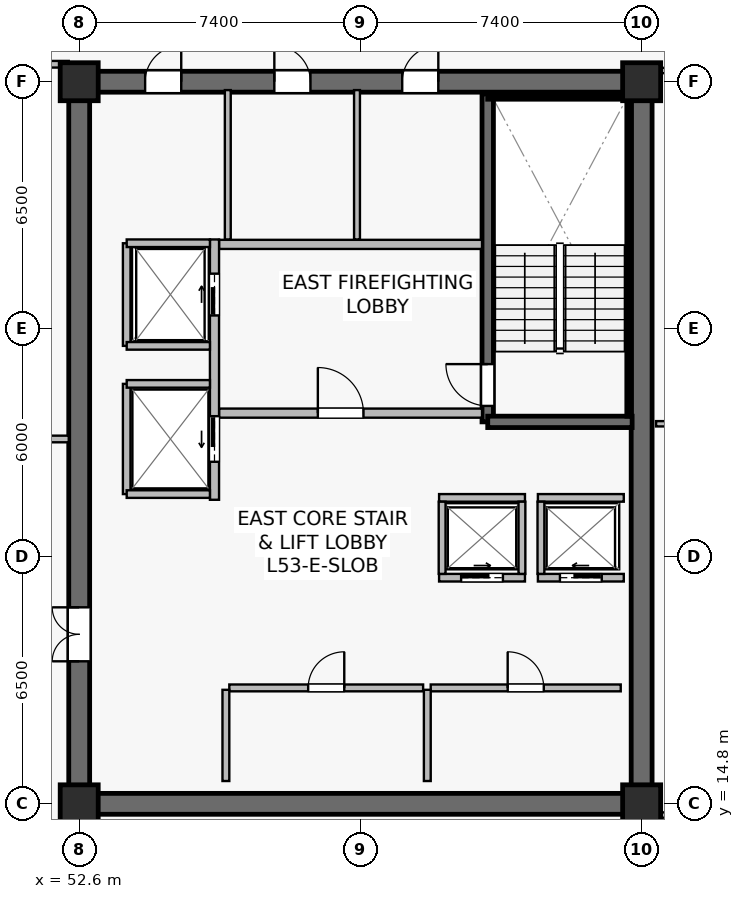
"""IFC4 building model, lengths in metres.
Left out: names, types, materials, properties, quantities, classifications, styles, units other than length and angle.
Written with IfcOpenShell. Run it as: python <this file> out.ifc"""

import sys

from ifc_helpers import new_model, si_unit, direction, frame, frame_2d, origin, origin_2d, place, context, subcontext, project, spatial, rectangle, extrude, source, transform, mapped, element, fill, save


model = new_model("IFC4")
c1 = context("Model", 3, precision=1e-05, world=origin(), true_north=direction((0.0, 1.0)))
c2 = subcontext(c1, "Body", "Model", "MODEL_VIEW")
j1 = project(units=[si_unit("LENGTHUNIT", "METRE"), si_unit("PLANEANGLEUNIT", "RADIAN")], contexts=[c1])
p1 = place(None, origin())
s1 = spatial("IfcSite", under=j1, at=p1, CompositionType="ELEMENT")
p2 = place(p1, origin())
s2 = spatial("IfcBuilding", under=s1, at=p2, CompositionType="ELEMENT")
p3 = place(p2, frame((0.0, 0.0, 221.9)))
s3 = spatial("IfcBuildingStorey", under=s2, at=p3, CompositionType="ELEMENT", Elevation=221.9)
p4 = place(p3, frame((52.325, 14.8, 0.0), z_axis=(0.0, 0.0, 1.0), x_axis=(1.0, 0.0, 0.0)))
e1 = element("IfcWall", 1, at=p4, inside=s3, PredefinedType="SHEAR", context=c2, shape_type="SweptSolid", body=[
    extrude(rectangle(XDim=15.35, YDim=0.55, at=frame_2d((7.675, 0.0))), origin(), (0.0, 0.0, 1.0), 3.8),
])
p5 = place(p3, frame((52.325, 33.8, 0.0), z_axis=(0.0, 0.0, 1.0), x_axis=(1.0, 0.0, 0.0)))
e2 = element("IfcWall", 2, at=p5, inside=s3, PredefinedType="SHEAR", context=c2, shape_type="SweptSolid", body=[
    extrude(rectangle(XDim=15.35, YDim=0.55, at=frame_2d((7.675, 0.0))), origin(), (0.0, 0.0, 1.0), 3.8),
])
p6 = place(p5, frame((8.775, 0.0, 0.0)))
e3 = element("IfcOpeningElement", 3, at=p6, cuts=e2, PredefinedType="OPENING", context=c2, shape_type="SweptSolid", body=[
    extrude(rectangle(XDim=0.95, YDim=2.15, at=frame_2d((0.475, 1.075))), frame((0.0, 0.285, 0.0), z_axis=(0.0, -1.0, 0.0), x_axis=(1.0, 0.0, 0.0)), (0.0, 0.0, 1.0), 0.57),
])
p7 = place(p5, frame((5.41, 0.0, 0.0)))
e4 = element("IfcOpeningElement", 4, at=p7, cuts=e2, PredefinedType="OPENING", context=c2, shape_type="SweptSolid", body=[
    extrude(rectangle(XDim=0.95, YDim=2.15, at=frame_2d((0.475, 1.075))), frame((0.0, 0.285, 0.0), z_axis=(0.0, -1.0, 0.0), x_axis=(1.0, 0.0, 0.0)), (0.0, 0.0, 1.0), 0.57),
])
p8 = place(p5, frame((2.01, 0.0, 0.0)))
e5 = element("IfcOpeningElement", 5, at=p8, cuts=e2, PredefinedType="OPENING", context=c2, shape_type="SweptSolid", body=[
    extrude(rectangle(XDim=0.95, YDim=2.15, at=frame_2d((0.475, 1.075))), frame((0.0, 0.285, 0.0), z_axis=(0.0, -1.0, 0.0), x_axis=(1.0, 0.0, 0.0)), (0.0, 0.0, 1.0), 0.57),
])
p9 = place(p3, frame((52.6, 15.075, 0.0), z_axis=(0.0, 0.0, 1.0), x_axis=(0.0, 1.0, 0.0)))
e6 = element("IfcWall", 6, at=p9, inside=s3, PredefinedType="SHEAR", context=c2, shape_type="SweptSolid", body=[
    extrude(rectangle(XDim=18.45, YDim=0.55, at=frame_2d((9.225, 0.0))), origin(), (0.0, 0.0, 1.0), 3.8),
])
p10 = place(p9, frame((3.475, 0.0, 0.0)))
e7 = element("IfcOpeningElement", 7, at=p10, cuts=e6, PredefinedType="OPENING", context=c2, shape_type="SweptSolid", body=[
    extrude(rectangle(XDim=1.42, YDim=2.2, at=frame_2d((0.71, 1.1))), frame((0.0, 0.285, 0.0), z_axis=(0.0, -1.0, 0.0), x_axis=(1.0, 0.0, 0.0)), (0.0, 0.0, 1.0), 0.57),
])
p11 = place(p3, frame((67.4, 15.075, 0.0), z_axis=(0.0, 0.0, 1.0), x_axis=(0.0, 1.0, 0.0)))
e8 = element("IfcWall", 8, at=p11, inside=s3, PredefinedType="SHEAR", context=c2, shape_type="SweptSolid", body=[
    extrude(rectangle(XDim=18.45, YDim=0.55, at=frame_2d((9.225, 0.0))), origin(), (0.0, 0.0, 1.0), 3.8),
])
p12 = place(p3, frame((63.35, 24.85, 0.0), z_axis=(0.0, 0.0, 1.0), x_axis=(0.0, 1.0, 0.0)))
e9 = element("IfcWall", 9, at=p12, inside=s3, PredefinedType="SHEAR", context=c2, shape_type="SweptSolid", body=[
    extrude(rectangle(XDim=8.63, YDim=0.3, at=frame_2d((4.315, 0.0))), origin(), (0.0, 0.0, 1.0), 3.8),
])
p13 = place(p12, frame((0.42, 0.0, 0.0)))
e10 = element("IfcOpeningElement", 10, at=p13, cuts=e9, PredefinedType="OPENING", context=c2, shape_type="SweptSolid", body=[
    extrude(rectangle(XDim=1.1, YDim=2.15, at=frame_2d((0.55, 1.075))), frame((0.0, 0.16, 0.0), z_axis=(0.0, -1.0, 0.0), x_axis=(1.0, 0.0, 0.0)), (0.0, 0.0, 1.0), 0.32),
])
p14 = place(p3, frame((63.35, 24.85, 0.0), z_axis=(0.0, 0.0, 1.0), x_axis=(1.0, 0.0, 0.0)))
e11 = element("IfcWall", 11, at=p14, inside=s3, PredefinedType="SHEAR", context=c2, shape_type="SweptSolid", body=[
    extrude(rectangle(XDim=3.8, YDim=0.3, at=frame_2d((1.9, 0.0))), origin(), (0.0, 0.0, 1.0), 3.8),
])
p15 = place(p3, frame((63.35, 33.4, 0.0), z_axis=(0.0, 0.0, 1.0), x_axis=(1.0, 0.0, 0.0)))
e12 = element("IfcWall", 12, at=p15, inside=s3, PredefinedType="SOLIDWALL", context=c2, shape_type="SweptSolid", body=[
    extrude(rectangle(XDim=3.72, YDim=0.12, at=frame_2d((1.86, 0.0))), origin(), (0.0, 0.0, 1.0), 3.8),
])
p16 = place(p3, frame((67.07, 25.0, 0.0), z_axis=(0.0, 0.0, 1.0), x_axis=(0.0, 1.0, 0.0)))
e13 = element("IfcWall", 13, at=p16, inside=s3, PredefinedType="SOLIDWALL", context=c2, shape_type="SweptSolid", body=[
    extrude(rectangle(XDim=8.32, YDim=0.12, at=frame_2d((4.16, 0.0))), origin(), (0.0, 0.0, 1.0), 3.8),
])
m1 = source(origin(), c2, "Body", "SweptSolid", [
    extrude(rectangle(XDim=1.0, YDim=1.0, at=origin_2d()), origin(), (0.0, 0.0, 1.0), 4.1),
])
for number, where, z_axis, x_axis in (
    (14, (52.6, 14.8, 0.0), (0.0, 0.0, 1.0), (1.0, 0.0, 0.0)),
    (15, (67.4, 14.8, 0.0), (0.0, 0.0, 1.0), (1.0, 0.0, 0.0)),
    (16, (52.6, 33.8, 0.0), (0.0, 0.0, 1.0), (1.0, 0.0, 0.0)),
    (17, (67.4, 33.8, 0.0), (0.0, 0.0, 1.0), (1.0, 0.0, 0.0)),
):
    element("IfcColumn", number, at=place(p3, frame(where, z_axis=z_axis, x_axis=x_axis)), inside=s3, PredefinedType="COLUMN", context=c2, shape_type="MappedRepresentation", body=[
        mapped(m1, transform((0.0, 0.0, 0.0), scale=1.0)),
    ])
p17 = place(p3, frame((56.28, 25.08, 0.0), z_axis=(0.0, 0.0, 1.0), x_axis=(1.0, 0.0, 0.0)))
e18 = element("IfcWall", 18, at=p17, inside=s3, PredefinedType="SOLIDWALL", context=c2, shape_type="SweptSolid", body=[
    extrude(rectangle(XDim=6.92, YDim=0.24, at=frame_2d((3.46, 0.0))), origin(), (0.0, 0.0, 1.0), 3.197),
])
p18 = place(p17, frame((2.6, 0.0, 0.0)))
e19 = element("IfcOpeningElement", 19, at=p18, cuts=e18, PredefinedType="OPENING", context=c2, shape_type="SweptSolid", body=[
    extrude(rectangle(XDim=1.2, YDim=2.16, at=frame_2d((0.6, 1.08))), frame((0.0, 0.13, 0.0), z_axis=(0.0, -1.0, 0.0), x_axis=(1.0, 0.0, 0.0)), (0.0, 0.0, 1.0), 0.26),
])
p19 = place(p3, frame((56.28, 29.52, 0.0), z_axis=(0.0, 0.0, 1.0), x_axis=(1.0, 0.0, 0.0)))
e20 = element("IfcWall", 20, at=p19, inside=s3, PredefinedType="SOLIDWALL", context=c2, shape_type="SweptSolid", body=[
    extrude(rectangle(XDim=6.92, YDim=0.24, at=frame_2d((3.46, 0.0))), origin(), (0.0, 0.0, 1.0), 3.197),
])
p20 = place(p3, frame((56.16, 22.8, 0.0), z_axis=(0.0, 0.0, 1.0), x_axis=(0.0, 1.0, 0.0)))
e21 = element("IfcWall", 21, at=p20, inside=s3, PredefinedType="SOLIDWALL", context=c2, shape_type="SweptSolid", body=[
    extrude(rectangle(XDim=6.85, YDim=0.24, at=frame_2d((3.425, 0.0))), origin(), (0.0, 0.0, 1.0), 2.935),
])
p21 = place(p20, frame((4.85, 0.0, 0.0)))
e22 = element("IfcOpeningElement", 22, at=p21, cuts=e21, PredefinedType="OPENING", context=c2, shape_type="SweptSolid", body=[
    extrude(rectangle(XDim=1.1, YDim=2.22, at=frame_2d((0.55, 1.11))), frame((0.0, 0.13, 0.0), z_axis=(0.0, -1.0, 0.0), x_axis=(1.0, 0.0, 0.0)), (0.0, 0.0, 1.0), 0.26),
])
p22 = place(p20, frame((1.0, 0.0, 0.0)))
e23 = element("IfcOpeningElement", 23, at=p22, cuts=e21, PredefinedType="OPENING", context=c2, shape_type="SweptSolid", body=[
    extrude(rectangle(XDim=1.2, YDim=2.22, at=frame_2d((0.6, 1.11))), frame((0.0, 0.13, 0.0), z_axis=(0.0, -1.0, 0.0), x_axis=(1.0, 0.0, 0.0)), (0.0, 0.0, 1.0), 0.26),
])
p23 = place(p3, frame((64.67, 20.75, 0.0), z_axis=(0.0, 0.0, 1.0), x_axis=(1.0, 0.0, 0.0)))
e24 = element("IfcWall", 24, at=p23, inside=s3, PredefinedType="SOLIDWALL", context=c2, shape_type="SweptSolid", body=[
    extrude(rectangle(XDim=2.26, YDim=0.2, at=frame_2d((1.13, 0.0))), origin(), (0.0, 0.0, 1.0), 3.8),
])
p24 = place(p23, frame((0.58, 0.0, 0.0)))
e25 = element("IfcOpeningElement", 25, at=p24, cuts=e24, PredefinedType="OPENING", context=c2, shape_type="SweptSolid", body=[
    extrude(rectangle(XDim=1.1, YDim=2.22, at=frame_2d((0.55, 1.11))), frame((0.0, 0.11, 0.0), z_axis=(0.0, -1.0, 0.0), x_axis=(1.0, 0.0, 0.0)), (0.0, 0.0, 1.0), 0.22),
])
p25 = place(p3, frame((64.67, 22.85, 0.0), z_axis=(0.0, 0.0, 1.0), x_axis=(1.0, 0.0, 0.0)))
e26 = element("IfcWall", 26, at=p25, inside=s3, PredefinedType="SOLIDWALL", context=c2, shape_type="SweptSolid", body=[
    extrude(rectangle(XDim=2.26, YDim=0.2, at=frame_2d((1.13, 0.0))), origin(), (0.0, 0.0, 1.0), 3.8),
])
p26 = place(p3, frame((64.75, 20.85, 0.0), z_axis=(0.0, 0.0, 1.0), x_axis=(0.0, 1.0, 0.0)))
e27 = element("IfcWall", 27, at=p26, inside=s3, PredefinedType="SOLIDWALL", context=c2, shape_type="SweptSolid", body=[
    extrude(rectangle(XDim=1.9, YDim=0.18, at=frame_2d((0.95, 0.0))), origin(), (0.0, 0.0, 1.0), 3.8),
])
p27 = place(p3, frame((62.07, 20.75, 0.0), z_axis=(0.0, 0.0, 1.0), x_axis=(1.0, 0.0, 0.0)))
e28 = element("IfcWall", 28, at=p27, inside=s3, PredefinedType="SOLIDWALL", context=c2, shape_type="SweptSolid", body=[
    extrude(rectangle(XDim=2.26, YDim=0.2, at=frame_2d((1.13, 0.0))), origin(), (0.0, 0.0, 1.0), 3.8),
])
p28 = place(p27, frame((0.58, 0.0, 0.0)))
e29 = element("IfcOpeningElement", 29, at=p28, cuts=e28, PredefinedType="OPENING", context=c2, shape_type="SweptSolid", body=[
    extrude(rectangle(XDim=1.1, YDim=2.22, at=frame_2d((0.55, 1.11))), frame((0.0, 0.11, 0.0), z_axis=(0.0, -1.0, 0.0), x_axis=(1.0, 0.0, 0.0)), (0.0, 0.0, 1.0), 0.22),
])
p29 = place(p3, frame((62.07, 22.85, 0.0), z_axis=(0.0, 0.0, 1.0), x_axis=(1.0, 0.0, 0.0)))
e30 = element("IfcWall", 30, at=p29, inside=s3, PredefinedType="SOLIDWALL", context=c2, shape_type="SweptSolid", body=[
    extrude(rectangle(XDim=2.26, YDim=0.2, at=frame_2d((1.13, 0.0))), origin(), (0.0, 0.0, 1.0), 3.8),
])
for number, where, z_axis, x_axis in (
    (31, (62.15, 20.85, 0.0), (0.0, 0.0, 1.0), (0.0, 1.0, 0.0)),
    (32, (64.25, 20.85, 0.0), (0.0, 0.0, 1.0), (0.0, 1.0, 0.0)),
):
    element("IfcWall", number, at=place(p3, frame(where, z_axis=z_axis, x_axis=x_axis)), inside=s3, PredefinedType="SOLIDWALL", context=c2, shape_type="SweptSolid", body=[
        extrude(rectangle(XDim=1.9, YDim=0.18, at=frame_2d((0.95, 0.0))), origin(), (0.0, 0.0, 1.0), 3.8),
    ])
p30 = place(p3, frame((53.85, 26.85, 0.0), z_axis=(0.0, 0.0, 1.0), x_axis=(0.0, 1.0, 0.0)))
e33 = element("IfcWall", 33, at=p30, inside=s3, PredefinedType="SOLIDWALL", context=c2, shape_type="SweptSolid", body=[
    extrude(rectangle(XDim=2.7, YDim=0.2, at=frame_2d((1.35, 0.0))), origin(), (0.0, 0.0, 1.0), 3.8),
])
p31 = place(p3, frame((53.85, 29.55, 0.0), z_axis=(0.0, 0.0, 1.0), x_axis=(1.0, 0.0, 0.0)))
e34 = element("IfcWall", 34, at=p31, inside=s3, PredefinedType="SOLIDWALL", context=c2, shape_type="SweptSolid", body=[
    extrude(rectangle(XDim=2.19, YDim=0.2, at=frame_2d((1.095, 0.0))), origin(), (0.0, 0.0, 1.0), 3.8),
])
p32 = place(p3, frame((53.85, 26.85, 0.0), z_axis=(0.0, 0.0, 1.0), x_axis=(1.0, 0.0, 0.0)))
e35 = element("IfcWall", 35, at=p32, inside=s3, PredefinedType="SOLIDWALL", context=c2, shape_type="SweptSolid", body=[
    extrude(rectangle(XDim=2.19, YDim=0.2, at=frame_2d((1.095, 0.0))), origin(), (0.0, 0.0, 1.0), 3.197),
])
p33 = place(p3, frame((53.85, 22.95, 0.0), z_axis=(0.0, 0.0, 1.0), x_axis=(0.0, 1.0, 0.0)))
e36 = element("IfcWall", 36, at=p33, inside=s3, PredefinedType="SOLIDWALL", context=c2, shape_type="SweptSolid", body=[
    extrude(rectangle(XDim=2.9, YDim=0.2, at=frame_2d((1.45, 0.0))), origin(), (0.0, 0.0, 1.0), 2.935),
])
for number, where, z_axis, x_axis in (
    (37, (53.85, 25.85, 0.0), (0.0, 0.0, 1.0), (1.0, 0.0, 0.0)),
    (38, (53.85, 22.95, 0.0), (0.0, 0.0, 1.0), (1.0, 0.0, 0.0)),
):
    element("IfcWall", number, at=place(p3, frame(where, z_axis=z_axis, x_axis=x_axis)), inside=s3, PredefinedType="SOLIDWALL", context=c2, shape_type="SweptSolid", body=[
        extrude(rectangle(XDim=2.19, YDim=0.2, at=frame_2d((1.095, 0.0))), origin(), (0.0, 0.0, 1.0), 3.8),
    ])
p34 = place(p3, frame((61.85, 17.85, 0.0), z_axis=(0.0, 0.0, 1.0), x_axis=(1.0, 0.0, 0.0)))
e39 = element("IfcWall", 39, at=p34, inside=s3, PredefinedType="SOLIDWALL", context=c2, shape_type="SweptSolid", body=[
    extrude(rectangle(XDim=5.0, YDim=0.18, at=frame_2d((2.5, 0.0))), origin(), (0.0, 0.0, 1.0), 3.8),
])
p35 = place(p34, frame((2.025, 0.0, 0.0)))
e40 = element("IfcOpeningElement", 40, at=p35, cuts=e39, PredefinedType="OPENING", context=c2, shape_type="SweptSolid", body=[
    extrude(rectangle(XDim=0.95, YDim=2.15, at=frame_2d((0.475, 1.075))), frame((0.0, 0.1, 0.0), z_axis=(0.0, -1.0, 0.0), x_axis=(1.0, 0.0, 0.0)), (0.0, 0.0, 1.0), 0.2),
])
p36 = place(p3, frame((61.76, 15.4, 0.0), z_axis=(0.0, 0.0, 1.0), x_axis=(0.0, 1.0, 0.0)))
e41 = element("IfcWall", 41, at=p36, inside=s3, PredefinedType="SOLIDWALL", context=c2, shape_type="SweptSolid", body=[
    extrude(rectangle(XDim=2.4, YDim=0.18, at=frame_2d((1.2, 0.0))), origin(), (0.0, 0.0, 1.0), 3.8),
])
p37 = place(p3, frame((56.55, 17.85, 0.0), z_axis=(0.0, 0.0, 1.0), x_axis=(1.0, 0.0, 0.0)))
e42 = element("IfcWall", 42, at=p37, inside=s3, PredefinedType="SOLIDWALL", context=c2, shape_type="SweptSolid", body=[
    extrude(rectangle(XDim=5.1, YDim=0.18, at=frame_2d((2.55, 0.0))), origin(), (0.0, 0.0, 1.0), 3.197),
])
p38 = place(p37, frame((2.075, 0.0, 0.0)))
e43 = element("IfcOpeningElement", 43, at=p38, cuts=e42, PredefinedType="OPENING", context=c2, shape_type="SweptSolid", body=[
    extrude(rectangle(XDim=0.95, YDim=2.15, at=frame_2d((0.475, 1.075))), frame((0.0, 0.1, 0.0), z_axis=(0.0, -1.0, 0.0), x_axis=(1.0, 0.0, 0.0)), (0.0, 0.0, 1.0), 0.2),
])
p39 = place(p3, frame((56.46, 15.4, 0.0), z_axis=(0.0, 0.0, 1.0), x_axis=(0.0, 1.0, 0.0)))
e44 = element("IfcWall", 44, at=p39, inside=s3, PredefinedType="SOLIDWALL", context=c2, shape_type="SweptSolid", body=[
    extrude(rectangle(XDim=2.4, YDim=0.18, at=frame_2d((1.2, 0.0))), origin(), (0.0, 0.0, 1.0), 3.8),
])
p40 = place(p3, frame((59.91, 29.65, 0.0), z_axis=(0.0, 0.0, 1.0), x_axis=(0.0, 1.0, 0.0)))
e45 = element("IfcWall", 45, at=p40, inside=s3, PredefinedType="PLUMBINGWALL", context=c2, shape_type="SweptSolid", body=[
    extrude(rectangle(XDim=3.93, YDim=0.155, at=frame_2d((1.965, 0.0))), origin(), (0.0, 0.0, 1.0), 3.197),
])
p41 = place(p3, frame((56.51, 29.65, 0.0), z_axis=(0.0, 0.0, 1.0), x_axis=(0.0, 1.0, 0.0)))
e46 = element("IfcWall", 46, at=p41, inside=s3, PredefinedType="PLUMBINGWALL", context=c2, shape_type="SweptSolid", body=[
    extrude(rectangle(XDim=3.93, YDim=0.155, at=frame_2d((1.965, 0.0))), origin(), (0.0, 0.0, 1.0), 3.8),
])
p42 = place(p3, frame((48.3, 34.26, 0.0), z_axis=(0.0, 0.0, 1.0), x_axis=(1.0, 0.0, 0.0)))
e47 = element("IfcWall", 47, at=p42, inside=s3, PredefinedType="PARTITIONING", context=c2, shape_type="SweptSolid", body=[
    extrude(rectangle(XDim=4.025, YDim=0.175, at=frame_2d((2.012, 0.0))), origin(), (0.0, 0.0, 1.0), 3.485),
])
p43 = place(p3, frame((48.3, 24.4, 0.0), z_axis=(0.0, 0.0, 1.0), x_axis=(1.0, 0.0, 0.0)))
e48 = element("IfcWall", 48, at=p43, inside=s3, PredefinedType="PARTITIONING", context=c2, shape_type="SweptSolid", body=[
    extrude(rectangle(XDim=4.025, YDim=0.175, at=frame_2d((2.012, 0.0))), origin(), (0.0, 0.0, 1.0), 3.8),
])
p44 = place(p43, frame((1.35, 0.0, 0.0)))
e49 = element("IfcOpeningElement", 49, at=p44, cuts=e48, PredefinedType="OPENING", context=c2, shape_type="SweptSolid", body=[
    extrude(rectangle(XDim=0.95, YDim=2.15, at=frame_2d((0.475, 1.075))), frame((0.0, 0.098, 0.0), z_axis=(0.0, -1.0, 0.0), x_axis=(1.0, 0.0, 0.0)), (0.0, 0.0, 1.0), 0.195),
])
p45 = place(p3, frame((67.78, 24.8, 0.0), z_axis=(0.0, 0.0, 1.0), x_axis=(1.0, 0.0, 0.0)))
e50 = element("IfcWall", 50, at=p45, inside=s3, PredefinedType="PARTITIONING", context=c2, shape_type="SweptSolid", body=[
    extrude(rectangle(XDim=2.91, YDim=0.14, at=frame_2d((1.455, 0.0))), origin(), (0.0, 0.0, 1.0), 3.8),
])
p46 = place(p3, frame((67.78, 14.505, 0.0), z_axis=(0.0, 0.0, 1.0), x_axis=(1.0, 0.0, 0.0)))
e51 = element("IfcWall", 51, at=p46, inside=s3, PredefinedType="PARTITIONING", context=c2, shape_type="SweptSolid", body=[
    extrude(rectangle(XDim=2.91, YDim=0.14, at=frame_2d((1.455, 0.0))), origin(), (0.0, 0.0, 1.0), 3.8),
])
p47 = place(p46, frame((1.005, 0.0, 0.0)))
e52 = element("IfcOpeningElement", 52, at=p47, cuts=e51, PredefinedType="OPENING", context=c2, shape_type="SweptSolid", body=[
    extrude(rectangle(XDim=0.9, YDim=2.1, at=frame_2d((0.45, 1.05))), frame((0.0, 0.08, 0.0), z_axis=(0.0, -1.0, 0.0), x_axis=(1.0, 0.0, 0.0)), (0.0, 0.0, 1.0), 0.16),
])
p48 = place(p3, frame((67.78, 34.095, 0.0), z_axis=(0.0, 0.0, 1.0), x_axis=(1.0, 0.0, 0.0)))
e53 = element("IfcWall", 53, at=p48, inside=s3, PredefinedType="PARTITIONING", context=c2, shape_type="SweptSolid", body=[
    extrude(rectangle(XDim=2.91, YDim=0.14, at=frame_2d((1.455, 0.0))), origin(), (0.0, 0.0, 1.0), 3.8),
])
p49 = place(p48, frame((1.005, 0.0, 0.0)))
e54 = element("IfcOpeningElement", 54, at=p49, cuts=e53, PredefinedType="OPENING", context=c2, shape_type="SweptSolid", body=[
    extrude(rectangle(XDim=0.9, YDim=2.1, at=frame_2d((0.45, 1.05))), frame((0.0, 0.08, 0.0), z_axis=(0.0, -1.0, 0.0), x_axis=(1.0, 0.0, 0.0)), (0.0, 0.0, 1.0), 0.16),
])
m2 = source(origin(), c2, "Body", "SweptSolid", [
    extrude(rectangle(XDim=1.1, YDim=2.15, at=frame_2d((0.55, 1.075))), frame((0.0, 0.025, 0.0), z_axis=(0.0, -1.0, 0.0), x_axis=(1.0, 0.0, 0.0)), (0.0, 0.0, 1.0), 0.05),
])
p50 = place(p13, origin())
e55 = element("IfcDoor", 55, at=p50, inside=s3, OperationType="SINGLE_SWING_RIGHT", PredefinedType="DOOR", context=c2, shape_type="MappedRepresentation", body=[
    mapped(m2, transform((0.0, 0.0, 0.0), scale=1.0)),
])
fill(e10, e55)
m3 = source(origin(), c2, "Body", "SweptSolid", [
    extrude(rectangle(XDim=1.2, YDim=2.16, at=frame_2d((0.6, 1.08))), frame((0.0, 0.025, 0.0), z_axis=(0.0, -1.0, 0.0), x_axis=(1.0, 0.0, 0.0)), (0.0, 0.0, 1.0), 0.05),
])
p51 = place(p18, origin())
e56 = element("IfcDoor", 56, at=p51, inside=s3, OperationType="SINGLE_SWING_LEFT", PredefinedType="DOOR", context=c2, shape_type="MappedRepresentation", body=[
    mapped(m3, transform((0.0, 0.0, 0.0), scale=1.0)),
])
fill(e19, e56)
m4 = source(origin(), c2, "Body", "SweptSolid", [
    extrude(rectangle(XDim=1.1, YDim=2.22, at=frame_2d((0.55, 1.11))), frame((0.0, 0.025, 0.0), z_axis=(0.0, -1.0, 0.0), x_axis=(1.0, 0.0, 0.0)), (0.0, 0.0, 1.0), 0.05),
])
p52 = place(p24, origin())
e57 = element("IfcDoor", 57, at=p52, inside=s3, OperationType="SLIDING_TO_LEFT", PredefinedType="USERDEFINED", context=c2, shape_type="MappedRepresentation", body=[
    mapped(m4, transform((0.0, 0.0, 0.0), scale=1.0)),
])
fill(e25, e57)
p53 = place(p28, origin())
e58 = element("IfcDoor", 58, at=p53, inside=s3, OperationType="SLIDING_TO_RIGHT", PredefinedType="USERDEFINED", context=c2, shape_type="MappedRepresentation", body=[
    mapped(m4, transform((0.0, 0.0, 0.0), scale=1.0)),
])
fill(e29, e58)
p54 = place(p21, origin())
e59 = element("IfcDoor", 59, at=p54, inside=s3, OperationType="SLIDING_TO_RIGHT", PredefinedType="USERDEFINED", context=c2, shape_type="MappedRepresentation", body=[
    mapped(m4, transform((0.0, 0.0, 0.0), scale=1.0)),
])
fill(e22, e59)
m5 = source(origin(), c2, "Body", "SweptSolid", [
    extrude(rectangle(XDim=1.2, YDim=2.22, at=frame_2d((0.6, 1.11))), frame((0.0, 0.025, 0.0), z_axis=(0.0, -1.0, 0.0), x_axis=(1.0, 0.0, 0.0)), (0.0, 0.0, 1.0), 0.05),
])
p55 = place(p22, origin())
e60 = element("IfcDoor", 60, at=p55, inside=s3, OperationType="SLIDING_TO_LEFT", PredefinedType="USERDEFINED", context=c2, shape_type="MappedRepresentation", body=[
    mapped(m5, transform((0.0, 0.0, 0.0), scale=1.0)),
])
fill(e23, e60)
m6 = source(origin(), c2, "Body", "SweptSolid", [
    extrude(rectangle(XDim=0.95, YDim=2.15, at=frame_2d((0.475, 1.075))), frame((0.0, 0.025, 0.0), z_axis=(0.0, -1.0, 0.0), x_axis=(1.0, 0.0, 0.0)), (0.0, 0.0, 1.0), 0.05),
])
p56 = place(p35, origin())
e61 = element("IfcDoor", 61, at=p56, inside=s3, OperationType="SINGLE_SWING_LEFT", PredefinedType="DOOR", context=c2, shape_type="MappedRepresentation", body=[
    mapped(m6, transform((0.0, 0.0, 0.0), scale=1.0)),
])
fill(e40, e61)
p57 = place(p38, origin())
e62 = element("IfcDoor", 62, at=p57, inside=s3, OperationType="SINGLE_SWING_RIGHT", PredefinedType="DOOR", context=c2, shape_type="MappedRepresentation", body=[
    mapped(m6, transform((0.0, 0.0, 0.0), scale=1.0)),
])
fill(e43, e62)
m7 = source(origin(), c2, "Body", "SweptSolid", [
    extrude(rectangle(XDim=1.42, YDim=2.2, at=frame_2d((0.71, 1.1))), frame((0.0, 0.025, 0.0), z_axis=(0.0, -1.0, 0.0), x_axis=(1.0, 0.0, 0.0)), (0.0, 0.0, 1.0), 0.05),
])
p58 = place(p10, origin())
e63 = element("IfcDoor", 63, at=p58, inside=s3, OperationType="DOUBLE_DOOR_SINGLE_SWING", PredefinedType="DOOR", context=c2, shape_type="MappedRepresentation", body=[
    mapped(m7, transform((0.0, 0.0, 0.0), scale=1.0)),
])
fill(e7, e63)
p59 = place(p6, origin())
e64 = element("IfcDoor", 64, at=p59, inside=s3, OperationType="SINGLE_SWING_RIGHT", PredefinedType="DOOR", context=c2, shape_type="MappedRepresentation", body=[
    mapped(m6, transform((0.0, 0.0, 0.0), scale=1.0)),
])
fill(e3, e64)
p60 = place(p7, origin())
e65 = element("IfcDoor", 65, at=p60, inside=s3, OperationType="SINGLE_SWING_LEFT", PredefinedType="DOOR", context=c2, shape_type="MappedRepresentation", body=[
    mapped(m6, transform((0.0, 0.0, 0.0), scale=1.0)),
])
fill(e4, e65)
p61 = place(p8, origin())
e66 = element("IfcDoor", 66, at=p61, inside=s3, OperationType="SINGLE_SWING_RIGHT", PredefinedType="DOOR", context=c2, shape_type="MappedRepresentation", body=[
    mapped(m6, transform((0.0, 0.0, 0.0), scale=1.0)),
])
fill(e5, e66)
save(model, sys.argv[1])
